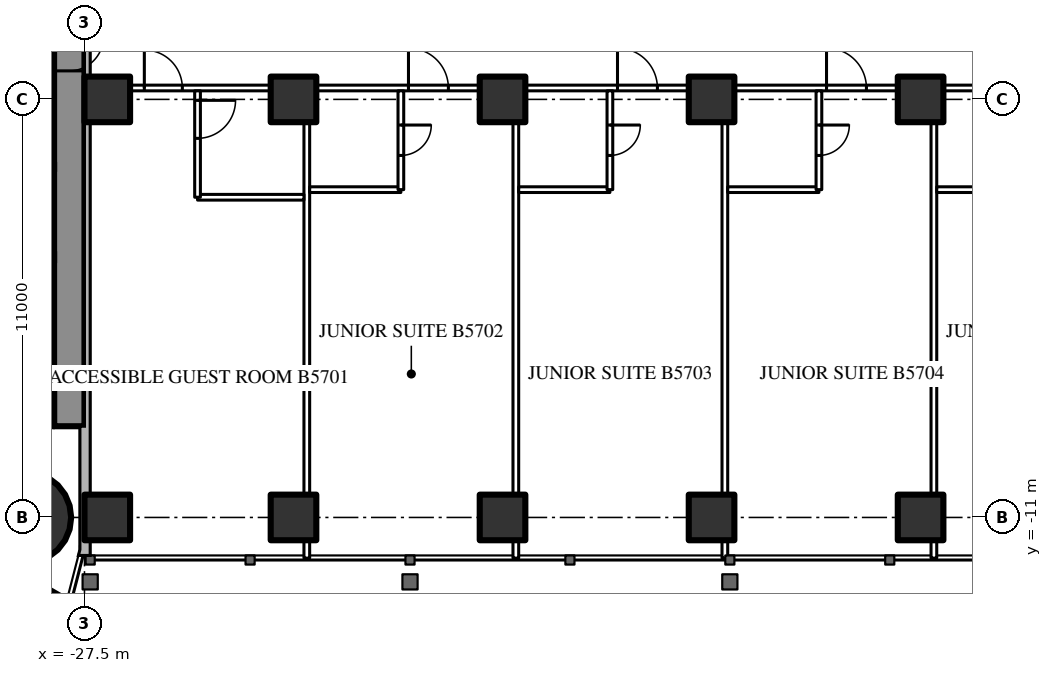
"""IFC4 building model, lengths in metres.
Left out: names, types, materials, properties, quantities, classifications, styles, units other than length and angle.
Written with IfcOpenShell. Run it as: python <this file> out.ifc"""

import sys

from ifc_helpers import new_model, si_unit, direction, frame, frame_2d, origin, origin_2d, place, context, subcontext, project, spatial, rectangle, hollow_rectangle, circle, extrude, element, fill, save


model = new_model("IFC4")
c1 = context("Model", 3, precision=1e-05, world=origin(), true_north=direction((0.0, 1.0)))
c2 = subcontext(c1, "Body", "Model", "MODEL_VIEW")
j1 = project(units=[si_unit("LENGTHUNIT", "METRE"), si_unit("PLANEANGLEUNIT", "RADIAN")], contexts=[c1])
p1 = place(None, origin())
s1 = spatial("IfcSite", under=j1, at=p1, CompositionType="ELEMENT")
p2 = place(p1, origin())
s2 = spatial("IfcBuilding", under=s1, at=p2, CompositionType="ELEMENT")
p3 = place(p2, frame((0.0, 0.0, 215.3)))
s3 = spatial("IfcBuildingStorey", under=s2, at=p3, CompositionType="ELEMENT", Elevation=215.3)
p4 = place(p3, frame((-29.05, -11.0, 0.0), z_axis=(0.0, 0.0, 1.0), x_axis=(1.0, 0.0, 0.0)))
e1 = element("IfcColumn", 1, at=p4, inside=s3, PredefinedType="COLUMN", context=c2, shape_type="SweptSolid", body=[
    extrude(circle(Radius=1.2, at=origin_2d()), origin(), (0.0, 0.0, 1.0), 3.6),
])
p5 = place(p3, frame((-27.9, 8.6, 0.0), z_axis=(0.0, 0.0, 1.0), x_axis=(0.0, -1.0, 0.0)))
e2 = element("IfcWall", 2, at=p5, inside=s3, PredefinedType="SHEAR", context=c2, shape_type="SweptSolid", body=[
    extrude(rectangle(XDim=17.2, YDim=0.8, at=frame_2d((8.6, 0.0))), origin(), (0.0, 0.0, 1.0), 3.6),
])
p6 = place(p5, frame((6.95, 0.0, 0.0)))
e3 = element("IfcOpeningElement", 3, at=p6, cuts=e2, PredefinedType="OPENING", context=c2, shape_type="SweptSolid", body=[
    extrude(rectangle(XDim=0.9, YDim=2.2, at=frame_2d((0.45, 1.1))), frame((0.0, 0.41, 0.0), z_axis=(0.0, -1.0, 0.0), x_axis=(1.0, 0.0, 0.0)), (0.0, 0.0, 1.0), 0.82),
])
p7 = place(p3, frame((-28.3, -8.0, 0.0), z_axis=(0.0, 0.0, 1.0), x_axis=(-1.0, 0.0, 0.0)))
e4 = element("IfcWall", 4, at=p7, inside=s3, PredefinedType="SHEAR", context=c2, shape_type="SweptSolid", body=[
    extrude(rectangle(XDim=8.4, YDim=1.2, at=frame_2d((4.2, 0.0))), origin(), (0.0, 0.0, 1.0), 3.6),
])
p8 = place(p7, frame((0.25, 0.0, 0.0)))
e5 = element("IfcOpeningElement", 5, at=p8, cuts=e4, PredefinedType="OPENING", context=c2, shape_type="SweptSolid", body=[
    extrude(rectangle(XDim=1.0, YDim=2.2, at=frame_2d((0.5, 1.1))), frame((0.0, 0.61, 0.0), z_axis=(0.0, -1.0, 0.0), x_axis=(1.0, 0.0, 0.0)), (0.0, 0.0, 1.0), 1.22),
])
p9 = place(p3, frame((-28.3, -4.15, 0.0), z_axis=(0.0, 0.0, 1.0), x_axis=(-1.0, 0.0, 0.0)))
e6 = element("IfcWall", 6, at=p9, inside=s3, PredefinedType="SHEAR", context=c2, shape_type="SweptSolid", body=[
    extrude(rectangle(XDim=8.4, YDim=0.3, at=frame_2d((4.2, 0.0))), origin(), (0.0, 0.0, 1.0), 3.6),
])
p10 = place(p3, frame((-28.3, -1.775, 0.0), z_axis=(0.0, 0.0, 1.0), x_axis=(-1.0, 0.0, 0.0)))
e7 = element("IfcWall", 7, at=p10, inside=s3, PredefinedType="SHEAR", context=c2, shape_type="SweptSolid", body=[
    extrude(rectangle(XDim=2.9, YDim=0.25, at=frame_2d((1.45, 0.0))), origin(), (0.0, 0.0, 1.0), 3.6),
])
p11 = place(p3, frame((-27.2, 14.3, 0.0), z_axis=(0.0, 0.0, 1.0), x_axis=(-0.866026593062, -0.499997940104, 0.0)))
e8 = element("IfcWall", 8, at=p11, inside=s3, PredefinedType="SHEAR", context=c2, shape_type="SweptSolid", body=[
    extrude(rectangle(XDim=28.946, YDim=1.2, at=frame_2d((14.473, 0.0))), origin(), (0.0, 0.0, 1.0), 3.6),
])
p12 = place(p11, frame((4.6, 0.0, 0.0)))
e9 = element("IfcOpeningElement", 9, at=p12, cuts=e8, PredefinedType="OPENING", context=c2, shape_type="SweptSolid", body=[
    extrude(rectangle(XDim=1.0, YDim=2.2, at=frame_2d((0.5, 1.1))), frame((0.0, 0.61, 0.0), z_axis=(0.0, -1.0, 0.0), x_axis=(1.0, 0.0, 0.0)), (0.0, 0.0, 1.0), 1.22),
])
p13 = place(p11, frame((13.395, 0.0, 0.0)))
e10 = element("IfcOpeningElement", 10, at=p13, cuts=e8, PredefinedType="OPENING", context=c2, shape_type="SweptSolid", body=[
    extrude(rectangle(XDim=1.8, YDim=2.2, at=frame_2d((0.9, 1.1))), frame((0.0, 0.61, 0.0), z_axis=(0.0, -1.0, 0.0), x_axis=(1.0, 0.0, 0.0)), (0.0, 0.0, 1.0), 1.22),
])
p14 = place(p3, frame((-27.2, -14.3, 0.0), z_axis=(0.0, 0.0, 1.0), x_axis=(-0.866024021859, 0.500002393557, 0.0)))
e11 = element("IfcWall", 11, at=p14, inside=s3, PredefinedType="SHEAR", context=c2, shape_type="SweptSolid", body=[
    extrude(rectangle(XDim=27.907, YDim=1.2, at=frame_2d((13.954, 0.0))), origin(), (0.0, 0.0, 1.0), 3.6),
])
p15 = place(p14, frame((4.6, 0.0, 0.0)))
e12 = element("IfcOpeningElement", 12, at=p15, cuts=e11, PredefinedType="OPENING", context=c2, shape_type="SweptSolid", body=[
    extrude(rectangle(XDim=1.0, YDim=2.2, at=frame_2d((0.5, 1.1))), frame((0.0, 0.61, 0.0), z_axis=(0.0, -1.0, 0.0), x_axis=(1.0, 0.0, 0.0)), (0.0, 0.0, 1.0), 1.22),
])
p16 = place(p14, frame((13.395, 0.0, 0.0)))
e13 = element("IfcOpeningElement", 13, at=p16, cuts=e11, PredefinedType="OPENING", context=c2, shape_type="SweptSolid", body=[
    extrude(rectangle(XDim=1.8, YDim=2.2, at=frame_2d((0.9, 1.1))), frame((0.0, 0.61, 0.0), z_axis=(0.0, -1.0, 0.0), x_axis=(1.0, 0.0, 0.0)), (0.0, 0.0, 1.0), 1.22),
])
for number, where, z_axis, x_axis in (
    (14, (-26.9, -11.0, 0.0), (0.0, 0.0, 1.0), (1.0, 0.0, 0.0)),
    (15, (-22.0, -11.0, 0.0), (0.0, 0.0, 1.0), (1.0, 0.0, 0.0)),
    (16, (-16.5, -11.0, 0.0), (0.0, 0.0, 1.0), (1.0, 0.0, 0.0)),
    (17, (-11.0, -11.0, 0.0), (0.0, 0.0, 1.0), (1.0, 0.0, 0.0)),
    (18, (-5.5, -11.0, 0.0), (0.0, 0.0, 1.0), (1.0, 0.0, 0.0)),
    (19, (-26.9, 0.0, 0.0), (0.0, 0.0, 1.0), (1.0, 0.0, 0.0)),
    (20, (-22.0, 0.0, 0.0), (0.0, 0.0, 1.0), (1.0, 0.0, 0.0)),
    (21, (-16.5, 0.0, 0.0), (0.0, 0.0, 1.0), (1.0, 0.0, 0.0)),
    (22, (-11.0, 0.0, 0.0), (0.0, 0.0, 1.0), (1.0, 0.0, 0.0)),
    (23, (-5.5, 0.0, 0.0), (0.0, 0.0, 1.0), (1.0, 0.0, 0.0)),
):
    element("IfcColumn", number, at=place(p3, frame(where, z_axis=z_axis, x_axis=x_axis)), inside=s3, PredefinedType="COLUMN", context=c2, shape_type="SweptSolid", body=[
        extrude(hollow_rectangle(XDim=1.2, YDim=1.2, WallThickness=0.12, at=origin_2d()), origin(), (0.0, 0.0, 1.0), 3.6),
    ])
p17 = place(p3, frame((-27.5, 0.3, 0.0), z_axis=(0.0, 0.0, 1.0), x_axis=(1.0, 0.0, 0.0)))
e24 = element("IfcWall", 24, at=p17, inside=s3, PredefinedType="PARTITIONING", context=c2, shape_type="SweptSolid", body=[
    extrude(rectangle(XDim=55.0, YDim=0.15, at=frame_2d((27.5, 0.0))), origin(), (0.0, 0.0, 1.0), 2.4),
])
p18 = place(p17, frame((1.575, 0.0, 0.0)))
e25 = element("IfcOpeningElement", 25, at=p18, cuts=e24, PredefinedType="OPENING", context=c2, shape_type="SweptSolid", body=[
    extrude(rectangle(XDim=1.0, YDim=2.2, at=frame_2d((0.5, 1.1))), frame((0.0, 0.085, 0.0), z_axis=(0.0, -1.0, 0.0), x_axis=(1.0, 0.0, 0.0)), (0.0, 0.0, 1.0), 0.17),
])
p19 = place(p17, frame((8.525, 0.0, 0.0)))
e26 = element("IfcOpeningElement", 26, at=p19, cuts=e24, PredefinedType="OPENING", context=c2, shape_type="SweptSolid", body=[
    extrude(rectangle(XDim=1.05, YDim=2.4, at=frame_2d((0.525, 1.2))), frame((0.0, 0.085, 0.0), z_axis=(0.0, -1.0, 0.0), x_axis=(1.0, 0.0, 0.0)), (0.0, 0.0, 1.0), 0.17),
])
p20 = place(p17, frame((14.025, 0.0, 0.0)))
e27 = element("IfcOpeningElement", 27, at=p20, cuts=e24, PredefinedType="OPENING", context=c2, shape_type="SweptSolid", body=[
    extrude(rectangle(XDim=1.05, YDim=2.4, at=frame_2d((0.525, 1.2))), frame((0.0, 0.085, 0.0), z_axis=(0.0, -1.0, 0.0), x_axis=(1.0, 0.0, 0.0)), (0.0, 0.0, 1.0), 0.17),
])
p21 = place(p17, frame((19.525, 0.0, 0.0)))
e28 = element("IfcOpeningElement", 28, at=p21, cuts=e24, PredefinedType="OPENING", context=c2, shape_type="SweptSolid", body=[
    extrude(rectangle(XDim=1.05, YDim=2.4, at=frame_2d((0.525, 1.2))), frame((0.0, 0.085, 0.0), z_axis=(0.0, -1.0, 0.0), x_axis=(1.0, 0.0, 0.0)), (0.0, 0.0, 1.0), 0.17),
])
p22 = place(p17, frame((25.025, 0.0, 0.0)))
e29 = element("IfcOpeningElement", 29, at=p22, cuts=e24, PredefinedType="OPENING", context=c2, shape_type="SweptSolid", body=[
    extrude(rectangle(XDim=1.05, YDim=2.4, at=frame_2d((0.525, 1.2))), frame((0.0, 0.085, 0.0), z_axis=(0.0, -1.0, 0.0), x_axis=(1.0, 0.0, 0.0)), (0.0, 0.0, 1.0), 0.17),
])
p23 = place(p17, frame((30.525, 0.0, 0.0)))
e30 = element("IfcOpeningElement", 30, at=p23, cuts=e24, PredefinedType="OPENING", context=c2, shape_type="SweptSolid", body=[
    extrude(rectangle(XDim=1.05, YDim=2.4, at=frame_2d((0.525, 1.2))), frame((0.0, 0.085, 0.0), z_axis=(0.0, -1.0, 0.0), x_axis=(1.0, 0.0, 0.0)), (0.0, 0.0, 1.0), 0.17),
])
p24 = place(p17, frame((36.025, 0.0, 0.0)))
e31 = element("IfcOpeningElement", 31, at=p24, cuts=e24, PredefinedType="OPENING", context=c2, shape_type="SweptSolid", body=[
    extrude(rectangle(XDim=1.05, YDim=2.4, at=frame_2d((0.525, 1.2))), frame((0.0, 0.085, 0.0), z_axis=(0.0, -1.0, 0.0), x_axis=(1.0, 0.0, 0.0)), (0.0, 0.0, 1.0), 0.17),
])
p25 = place(p17, frame((41.525, 0.0, 0.0)))
e32 = element("IfcOpeningElement", 32, at=p25, cuts=e24, PredefinedType="OPENING", context=c2, shape_type="SweptSolid", body=[
    extrude(rectangle(XDim=1.05, YDim=2.4, at=frame_2d((0.525, 1.2))), frame((0.0, 0.085, 0.0), z_axis=(0.0, -1.0, 0.0), x_axis=(1.0, 0.0, 0.0)), (0.0, 0.0, 1.0), 0.17),
])
p26 = place(p17, frame((47.025, 0.0, 0.0)))
e33 = element("IfcOpeningElement", 33, at=p26, cuts=e24, PredefinedType="OPENING", context=c2, shape_type="SweptSolid", body=[
    extrude(rectangle(XDim=1.05, YDim=2.4, at=frame_2d((0.525, 1.2))), frame((0.0, 0.085, 0.0), z_axis=(0.0, -1.0, 0.0), x_axis=(1.0, 0.0, 0.0)), (0.0, 0.0, 1.0), 0.17),
])
p27 = place(p17, frame((52.525, 0.0, 0.0)))
e34 = element("IfcOpeningElement", 34, at=p27, cuts=e24, PredefinedType="OPENING", context=c2, shape_type="SweptSolid", body=[
    extrude(rectangle(XDim=1.05, YDim=2.4, at=frame_2d((0.525, 1.2))), frame((0.0, 0.085, 0.0), z_axis=(0.0, -1.0, 0.0), x_axis=(1.0, 0.0, 0.0)), (0.0, 0.0, 1.0), 0.17),
])
for number, where, z_axis, x_axis in (
    (35, (-21.65, -12.07, 0.0), (0.0, 0.0, 1.0), (0.0, 1.0, 0.0)),
    (36, (-16.15, -12.07, 0.0), (0.0, 0.0, 1.0), (0.0, 1.0, 0.0)),
    (37, (-10.65, -12.07, 0.0), (0.0, 0.0, 1.0), (0.0, 1.0, 0.0)),
    (38, (-5.15, -12.07, 0.0), (0.0, 0.0, 1.0), (0.0, 1.0, 0.0)),
):
    element("IfcWall", number, at=place(p3, frame(where, z_axis=z_axis, x_axis=x_axis)), inside=s3, PredefinedType="PARTITIONING", context=c2, shape_type="SweptSolid", body=[
        extrude(rectangle(XDim=12.37, YDim=0.15, at=frame_2d((6.185, 0.0))), origin(), (0.0, 0.0, 1.0), 3.4),
    ])
p28 = place(p3, frame((-24.525, -2.575, 0.0), z_axis=(0.0, 0.0, 1.0), x_axis=(1.0, 0.0, 0.0)))
e39 = element("IfcWall", 39, at=p28, inside=s3, PredefinedType="PARTITIONING", context=c2, shape_type="SweptSolid", body=[
    extrude(rectangle(XDim=2.8, YDim=0.15, at=frame_2d((1.4, 0.0))), origin(), (0.0, 0.0, 1.0), 3.4),
])
p29 = place(p3, frame((-24.525, -2.575, 0.0), z_axis=(0.0, 0.0, 1.0), x_axis=(0.0, 1.0, 0.0)))
e40 = element("IfcWall", 40, at=p29, inside=s3, PredefinedType="PARTITIONING", context=c2, shape_type="SweptSolid", body=[
    extrude(rectangle(XDim=2.8, YDim=0.15, at=frame_2d((1.4, 0.0))), origin(), (0.0, 0.0, 1.0), 3.4),
])
p30 = place(p29, frame((1.55, 0.0, 0.0)))
e41 = element("IfcOpeningElement", 41, at=p30, cuts=e40, PredefinedType="OPENING", context=c2, shape_type="SweptSolid", body=[
    extrude(rectangle(XDim=1.0, YDim=2.2, at=frame_2d((0.5, 1.1))), frame((0.0, 0.085, 0.0), z_axis=(0.0, -1.0, 0.0), x_axis=(1.0, 0.0, 0.0)), (0.0, 0.0, 1.0), 0.17),
])
p31 = place(p3, frame((-21.575, -2.375, 0.0), z_axis=(0.0, 0.0, 1.0), x_axis=(1.0, 0.0, 0.0)))
e42 = element("IfcWall", 42, at=p31, inside=s3, PredefinedType="PARTITIONING", context=c2, shape_type="SweptSolid", body=[
    extrude(rectangle(XDim=2.4, YDim=0.15, at=frame_2d((1.2, 0.0))), origin(), (0.0, 0.0, 1.0), 3.4),
])
p32 = place(p3, frame((-19.175, -2.375, 0.0), z_axis=(0.0, 0.0, 1.0), x_axis=(0.0, 1.0, 0.0)))
e43 = element("IfcWall", 43, at=p32, inside=s3, PredefinedType="PARTITIONING", context=c2, shape_type="SweptSolid", body=[
    extrude(rectangle(XDim=2.6, YDim=0.15, at=frame_2d((1.3, 0.0))), origin(), (0.0, 0.0, 1.0), 3.4),
])
p33 = place(p32, frame((0.9, 0.0, 0.0)))
e44 = element("IfcOpeningElement", 44, at=p33, cuts=e43, PredefinedType="OPENING", context=c2, shape_type="SweptSolid", body=[
    extrude(rectangle(XDim=0.8, YDim=2.2, at=frame_2d((0.4, 1.1))), frame((0.0, 0.085, 0.0), z_axis=(0.0, -1.0, 0.0), x_axis=(1.0, 0.0, 0.0)), (0.0, 0.0, 1.0), 0.17),
])
p34 = place(p3, frame((-16.075, -2.375, 0.0), z_axis=(0.0, 0.0, 1.0), x_axis=(1.0, 0.0, 0.0)))
e45 = element("IfcWall", 45, at=p34, inside=s3, PredefinedType="PARTITIONING", context=c2, shape_type="SweptSolid", body=[
    extrude(rectangle(XDim=2.4, YDim=0.15, at=frame_2d((1.2, 0.0))), origin(), (0.0, 0.0, 1.0), 3.4),
])
p35 = place(p3, frame((-13.675, -2.375, 0.0), z_axis=(0.0, 0.0, 1.0), x_axis=(0.0, 1.0, 0.0)))
e46 = element("IfcWall", 46, at=p35, inside=s3, PredefinedType="PARTITIONING", context=c2, shape_type="SweptSolid", body=[
    extrude(rectangle(XDim=2.6, YDim=0.15, at=frame_2d((1.3, 0.0))), origin(), (0.0, 0.0, 1.0), 3.4),
])
p36 = place(p35, frame((0.9, 0.0, 0.0)))
e47 = element("IfcOpeningElement", 47, at=p36, cuts=e46, PredefinedType="OPENING", context=c2, shape_type="SweptSolid", body=[
    extrude(rectangle(XDim=0.8, YDim=2.2, at=frame_2d((0.4, 1.1))), frame((0.0, 0.085, 0.0), z_axis=(0.0, -1.0, 0.0), x_axis=(1.0, 0.0, 0.0)), (0.0, 0.0, 1.0), 0.17),
])
p37 = place(p3, frame((-10.575, -2.375, 0.0), z_axis=(0.0, 0.0, 1.0), x_axis=(1.0, 0.0, 0.0)))
e48 = element("IfcWall", 48, at=p37, inside=s3, PredefinedType="PARTITIONING", context=c2, shape_type="SweptSolid", body=[
    extrude(rectangle(XDim=2.4, YDim=0.15, at=frame_2d((1.2, 0.0))), origin(), (0.0, 0.0, 1.0), 3.4),
])
p38 = place(p3, frame((-8.175, -2.375, 0.0), z_axis=(0.0, 0.0, 1.0), x_axis=(0.0, 1.0, 0.0)))
e49 = element("IfcWall", 49, at=p38, inside=s3, PredefinedType="PARTITIONING", context=c2, shape_type="SweptSolid", body=[
    extrude(rectangle(XDim=2.6, YDim=0.15, at=frame_2d((1.3, 0.0))), origin(), (0.0, 0.0, 1.0), 3.4),
])
p39 = place(p38, frame((0.9, 0.0, 0.0)))
e50 = element("IfcOpeningElement", 50, at=p39, cuts=e49, PredefinedType="OPENING", context=c2, shape_type="SweptSolid", body=[
    extrude(rectangle(XDim=0.8, YDim=2.2, at=frame_2d((0.4, 1.1))), frame((0.0, 0.085, 0.0), z_axis=(0.0, -1.0, 0.0), x_axis=(1.0, 0.0, 0.0)), (0.0, 0.0, 1.0), 0.17),
])
p40 = place(p3, frame((-5.075, -2.375, 0.0), z_axis=(0.0, 0.0, 1.0), x_axis=(1.0, 0.0, 0.0)))
e51 = element("IfcWall", 51, at=p40, inside=s3, PredefinedType="PARTITIONING", context=c2, shape_type="SweptSolid", body=[
    extrude(rectangle(XDim=2.4, YDim=0.15, at=frame_2d((1.2, 0.0))), origin(), (0.0, 0.0, 1.0), 3.4),
])
p41 = place(p6, origin())
e52 = element("IfcDoor", 52, at=p41, inside=s3, OperationType="SINGLE_SWING_LEFT", PredefinedType="DOOR", context=c2, shape_type="SweptSolid", body=[
    extrude(rectangle(XDim=0.9, YDim=2.2, at=frame_2d((0.45, 1.1))), frame((0.0, 0.025, 0.0), z_axis=(0.0, -1.0, 0.0), x_axis=(1.0, 0.0, 0.0)), (0.0, 0.0, 1.0), 0.05),
])
fill(e3, e52)
p42 = place(p30, origin())
e53 = element("IfcDoor", 53, at=p42, inside=s3, OperationType="SINGLE_SWING_RIGHT", PredefinedType="DOOR", context=c2, shape_type="SweptSolid", body=[
    extrude(rectangle(XDim=1.0, YDim=2.2, at=frame_2d((0.5, 1.1))), frame((0.0, 0.025, 0.0), z_axis=(0.0, -1.0, 0.0), x_axis=(1.0, 0.0, 0.0)), (0.0, 0.0, 1.0), 0.05),
])
fill(e41, e53)
p43 = place(p18, origin())
e54 = element("IfcDoor", 54, at=p43, inside=s3, OperationType="SINGLE_SWING_LEFT", PredefinedType="DOOR", context=c2, shape_type="SweptSolid", body=[
    extrude(rectangle(XDim=1.0, YDim=2.2, at=frame_2d((0.5, 1.1))), frame((0.0, 0.025, 0.0), z_axis=(0.0, -1.0, 0.0), x_axis=(1.0, 0.0, 0.0)), (0.0, 0.0, 1.0), 0.05),
])
fill(e25, e54)
p44 = place(p33, origin())
e55 = element("IfcDoor", 55, at=p44, inside=s3, OperationType="SINGLE_SWING_RIGHT", PredefinedType="DOOR", context=c2, shape_type="SweptSolid", body=[
    extrude(rectangle(XDim=0.8, YDim=2.2, at=frame_2d((0.4, 1.1))), frame((0.0, 0.025, 0.0), z_axis=(0.0, -1.0, 0.0), x_axis=(1.0, 0.0, 0.0)), (0.0, 0.0, 1.0), 0.05),
])
fill(e44, e55)
p45 = place(p19, origin())
e56 = element("IfcDoor", 56, at=p45, inside=s3, OperationType="SINGLE_SWING_LEFT", PredefinedType="DOOR", context=c2, shape_type="SweptSolid", body=[
    extrude(rectangle(XDim=1.05, YDim=2.4, at=frame_2d((0.525, 1.2))), frame((0.0, 0.025, 0.0), z_axis=(0.0, -1.0, 0.0), x_axis=(1.0, 0.0, 0.0)), (0.0, 0.0, 1.0), 0.05),
])
fill(e26, e56)
p46 = place(p36, origin())
e57 = element("IfcDoor", 57, at=p46, inside=s3, OperationType="SINGLE_SWING_RIGHT", PredefinedType="DOOR", context=c2, shape_type="SweptSolid", body=[
    extrude(rectangle(XDim=0.8, YDim=2.2, at=frame_2d((0.4, 1.1))), frame((0.0, 0.025, 0.0), z_axis=(0.0, -1.0, 0.0), x_axis=(1.0, 0.0, 0.0)), (0.0, 0.0, 1.0), 0.05),
])
fill(e47, e57)
p47 = place(p20, origin())
e58 = element("IfcDoor", 58, at=p47, inside=s3, OperationType="SINGLE_SWING_LEFT", PredefinedType="DOOR", context=c2, shape_type="SweptSolid", body=[
    extrude(rectangle(XDim=1.05, YDim=2.4, at=frame_2d((0.525, 1.2))), frame((0.0, 0.025, 0.0), z_axis=(0.0, -1.0, 0.0), x_axis=(1.0, 0.0, 0.0)), (0.0, 0.0, 1.0), 0.05),
])
fill(e27, e58)
p48 = place(p39, origin())
e59 = element("IfcDoor", 59, at=p48, inside=s3, OperationType="SINGLE_SWING_RIGHT", PredefinedType="DOOR", context=c2, shape_type="SweptSolid", body=[
    extrude(rectangle(XDim=0.8, YDim=2.2, at=frame_2d((0.4, 1.1))), frame((0.0, 0.025, 0.0), z_axis=(0.0, -1.0, 0.0), x_axis=(1.0, 0.0, 0.0)), (0.0, 0.0, 1.0), 0.05),
])
fill(e50, e59)
p49 = place(p21, origin())
e60 = element("IfcDoor", 60, at=p49, inside=s3, OperationType="SINGLE_SWING_LEFT", PredefinedType="DOOR", context=c2, shape_type="SweptSolid", body=[
    extrude(rectangle(XDim=1.05, YDim=2.4, at=frame_2d((0.525, 1.2))), frame((0.0, 0.025, 0.0), z_axis=(0.0, -1.0, 0.0), x_axis=(1.0, 0.0, 0.0)), (0.0, 0.0, 1.0), 0.05),
])
fill(e28, e60)
save(model, sys.argv[1])
